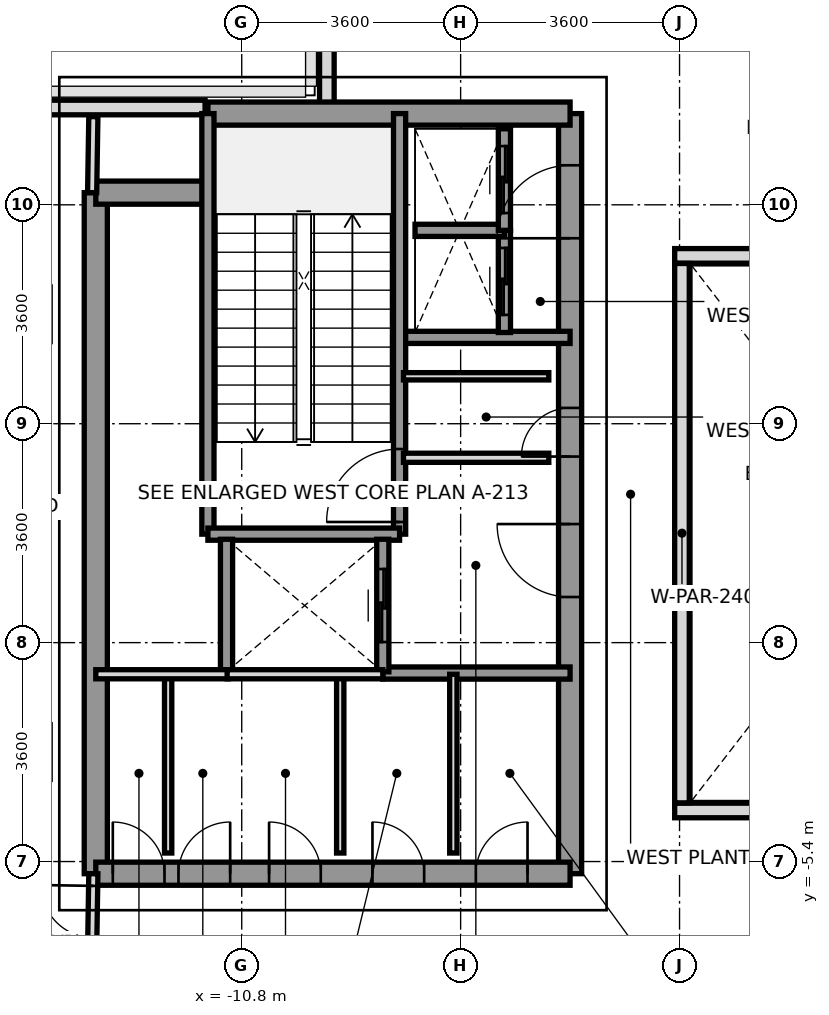
"""IFC4 building model, lengths in metres.
Left out: names, types, materials, properties, quantities, classifications, styles, units other than length and angle.
Written with IfcOpenShell. Run it as: python <this file> out.ifc"""

import sys

from ifc_helpers import new_model, si_unit, direction, frame, frame_2d, origin, place, context, subcontext, project, spatial, rectangle, extrude, source, transform, mapped, element, fill, save


model = new_model("IFC4")
c1 = context("Model", 3, precision=1e-05, world=origin(), true_north=direction((0.0, 1.0)))
c2 = subcontext(c1, "Body", "Model", "MODEL_VIEW")
j1 = project(units=[si_unit("LENGTHUNIT", "METRE"), si_unit("PLANEANGLEUNIT", "RADIAN")], contexts=[c1])
p1 = place(None, origin())
s1 = spatial("IfcSite", under=j1, at=p1, CompositionType="ELEMENT")
p2 = place(p1, origin())
s2 = spatial("IfcBuilding", under=s1, at=p2, CompositionType="ELEMENT")
p3 = place(p2, frame((0.0, 0.0, 214.8)))
s3 = spatial("IfcBuildingStorey", under=s2, at=p3, CompositionType="ELEMENT", Elevation=214.8)
p4 = place(p3, frame((-14.072, 7.0, 0.0), z_axis=(0.0, 0.0, 1.0), x_axis=(1.0, 0.0, 0.0)))
e1 = element("IfcWall", 1, at=p4, inside=s3, PredefinedType="PARAPET", context=c2, shape_type="SweptSolid", body=[
    extrude(rectangle(XDim=2.669, YDim=0.24, at=frame_2d((1.334, 0.0))), origin(), (0.0, 0.0, 1.0), 1.15),
])
p5 = place(p3, frame((-9.4, 6.953, 0.0), z_axis=(0.0, 0.0, 1.0), x_axis=(0.0, 1.0, 0.0)))
e2 = element("IfcWall", 2, at=p5, inside=s3, PredefinedType="PARAPET", context=c2, shape_type="SweptSolid", body=[
    extrude(rectangle(XDim=1.594, YDim=0.24, at=frame_2d((0.797, 0.0))), origin(), (0.0, 0.0, 1.0), 1.15),
])
p6 = place(p3, frame((-13.2, -5.6, 0.0), z_axis=(0.0, 0.0, 1.0), x_axis=(0.0, 1.0, 0.0)))
e3 = element("IfcWall", 3, at=p6, inside=s3, PredefinedType="SHEAR", context=c2, shape_type="SweptSolid", body=[
    extrude(rectangle(XDim=11.2, YDim=0.38, at=frame_2d((5.6, 0.0))), origin(), (0.0, 0.0, 1.0), 4.41),
])
p7 = place(p3, frame((-5.4, -5.6, 0.0), z_axis=(0.0, 0.0, 1.0), x_axis=(0.0, 1.0, 0.0)))
e4 = element("IfcWall", 4, at=p7, inside=s3, PredefinedType="SHEAR", context=c2, shape_type="SweptSolid", body=[
    extrude(rectangle(XDim=12.5, YDim=0.38, at=frame_2d((6.25, 0.0))), origin(), (0.0, 0.0, 1.0), 4.41),
])
p8 = place(p7, frame((4.55, 0.0, 0.0)))
e5 = element("IfcOpeningElement", 5, at=p8, cuts=e4, PredefinedType="OPENING", context=c2, shape_type="SweptSolid", body=[
    extrude(rectangle(XDim=1.2, YDim=2.2, at=frame_2d((0.6, 1.1))), frame((0.0, 0.2, 0.0), z_axis=(0.0, -1.0, 0.0), x_axis=(1.0, 0.0, 0.0)), (0.0, 0.0, 1.0), 0.4),
])
p9 = place(p7, frame((10.45, 0.0, 0.0)))
e6 = element("IfcOpeningElement", 6, at=p9, cuts=e4, PredefinedType="OPENING", context=c2, shape_type="SweptSolid", body=[
    extrude(rectangle(XDim=1.2, YDim=2.2, at=frame_2d((0.6, 1.1))), frame((0.0, 0.2, 0.0), z_axis=(0.0, -1.0, 0.0), x_axis=(1.0, 0.0, 0.0)), (0.0, 0.0, 1.0), 0.4),
])
p10 = place(p7, frame((6.86, 0.0, 0.0)))
e7 = element("IfcOpeningElement", 7, at=p10, cuts=e4, PredefinedType="OPENING", context=c2, shape_type="SweptSolid", body=[
    extrude(rectangle(XDim=0.8, YDim=2.1, at=frame_2d((0.4, 1.05))), frame((0.0, 0.2, 0.0), z_axis=(0.0, -1.0, 0.0), x_axis=(1.0, 0.0, 0.0)), (0.0, 0.0, 1.0), 0.4),
])
p11 = place(p3, frame((-11.356, 6.9, 0.0), z_axis=(0.0, 0.0, 1.0), x_axis=(1.0, 0.0, 0.0)))
e8 = element("IfcWall", 8, at=p11, inside=s3, PredefinedType="SHEAR", context=c2, shape_type="SweptSolid", body=[
    extrude(rectangle(XDim=5.956, YDim=0.38, at=frame_2d((2.978, 0.0))), origin(), (0.0, 0.0, 1.0), 4.41),
])
p12 = place(p3, frame((-13.2, 5.6, 0.0), z_axis=(0.0, 0.0, 1.0), x_axis=(1.0, 0.0, 0.0)))
e9 = element("IfcWall", 9, at=p12, inside=s3, PredefinedType="SHEAR", context=c2, shape_type="SweptSolid", body=[
    extrude(rectangle(XDim=1.844, YDim=0.38, at=frame_2d((0.922, 0.0))), origin(), (0.0, 0.0, 1.0), 4.41),
])
p13 = place(p3, frame((-13.2, -5.6, 0.0), z_axis=(0.0, 0.0, 1.0), x_axis=(1.0, 0.0, 0.0)))
e10 = element("IfcWall", 10, at=p13, inside=s3, PredefinedType="SHEAR", context=c2, shape_type="SweptSolid", body=[
    extrude(rectangle(XDim=7.8, YDim=0.38, at=frame_2d((3.9, 0.0))), origin(), (0.0, 0.0, 1.0), 4.41),
])
p14 = place(p13, frame((0.28, 0.0, 0.0)))
e11 = element("IfcOpeningElement", 11, at=p14, cuts=e10, PredefinedType="OPENING", context=c2, shape_type="SweptSolid", body=[
    extrude(rectangle(XDim=0.85, YDim=2.1, at=frame_2d((0.425, 1.05))), frame((0.0, 0.2, 0.0), z_axis=(0.0, -1.0, 0.0), x_axis=(1.0, 0.0, 0.0)), (0.0, 0.0, 1.0), 0.4),
])
p15 = place(p13, frame((1.36, 0.0, 0.0)))
e12 = element("IfcOpeningElement", 12, at=p15, cuts=e10, PredefinedType="OPENING", context=c2, shape_type="SweptSolid", body=[
    extrude(rectangle(XDim=0.85, YDim=2.1, at=frame_2d((0.425, 1.05))), frame((0.0, 0.2, 0.0), z_axis=(0.0, -1.0, 0.0), x_axis=(1.0, 0.0, 0.0)), (0.0, 0.0, 1.0), 0.4),
])
p16 = place(p13, frame((2.85, 0.0, 0.0)))
e13 = element("IfcOpeningElement", 13, at=p16, cuts=e10, PredefinedType="OPENING", context=c2, shape_type="SweptSolid", body=[
    extrude(rectangle(XDim=0.85, YDim=2.1, at=frame_2d((0.425, 1.05))), frame((0.0, 0.2, 0.0), z_axis=(0.0, -1.0, 0.0), x_axis=(1.0, 0.0, 0.0)), (0.0, 0.0, 1.0), 0.4),
])
p17 = place(p13, frame((4.55, 0.0, 0.0)))
e14 = element("IfcOpeningElement", 14, at=p17, cuts=e10, PredefinedType="OPENING", context=c2, shape_type="SweptSolid", body=[
    extrude(rectangle(XDim=0.85, YDim=2.1, at=frame_2d((0.425, 1.05))), frame((0.0, 0.2, 0.0), z_axis=(0.0, -1.0, 0.0), x_axis=(1.0, 0.0, 0.0)), (0.0, 0.0, 1.0), 0.4),
])
p18 = place(p13, frame((6.25, 0.0, 0.0)))
e15 = element("IfcOpeningElement", 15, at=p18, cuts=e10, PredefinedType="OPENING", context=c2, shape_type="SweptSolid", body=[
    extrude(rectangle(XDim=0.85, YDim=2.1, at=frame_2d((0.425, 1.05))), frame((0.0, 0.2, 0.0), z_axis=(0.0, -1.0, 0.0), x_axis=(1.0, 0.0, 0.0)), (0.0, 0.0, 1.0), 0.4),
])
p19 = place(p3, frame((-8.18, 3.22, 0.0), z_axis=(0.0, 0.0, 1.0), x_axis=(1.0, 0.0, 0.0)))
e16 = element("IfcWall", 16, at=p19, inside=s3, PredefinedType="SOLIDWALL", context=c2, shape_type="SweptSolid", body=[
    extrude(rectangle(XDim=2.78, YDim=0.2, at=frame_2d((1.39, 0.0))), origin(), (0.0, 0.0, 1.0), 4.41),
])
p20 = place(p3, frame((-8.48, -2.3, 0.0), z_axis=(0.0, 0.0, 1.0), x_axis=(1.0, 0.0, 0.0)))
e17 = element("IfcWall", 17, at=p20, inside=s3, PredefinedType="SOLIDWALL", context=c2, shape_type="SweptSolid", body=[
    extrude(rectangle(XDim=3.08, YDim=0.2, at=frame_2d((1.54, 0.0))), origin(), (0.0, 0.0, 1.0), 4.41),
])
p21 = place(p3, frame((-8.204, -0.016, 0.0), z_axis=(0.0, 0.0, 1.0), x_axis=(0.0, 1.0, 0.0)))
e18 = element("IfcWall", 18, at=p21, inside=s3, PredefinedType="SOLIDWALL", context=c2, shape_type="SweptSolid", body=[
    extrude(rectangle(XDim=6.916, YDim=0.2, at=frame_2d((3.458, 0.0))), origin(), (0.0, 0.0, 1.0), 4.41),
])
p22 = place(p21, frame((0.2, 0.0, 0.0)))
e19 = element("IfcOpeningElement", 19, at=p22, cuts=e18, PredefinedType="OPENING", context=c2, shape_type="SweptSolid", body=[
    extrude(rectangle(XDim=1.2, YDim=2.2, at=frame_2d((0.6, 1.1))), frame((0.0, 0.11, 0.0), z_axis=(0.0, -1.0, 0.0), x_axis=(1.0, 0.0, 0.0)), (0.0, 0.0, 1.0), 0.22),
])
p23 = place(p3, frame((-11.356, -0.016, 0.0), z_axis=(0.0, 0.0, 1.0), x_axis=(0.0, 1.0, 0.0)))
e20 = element("IfcWall", 20, at=p23, inside=s3, PredefinedType="SOLIDWALL", context=c2, shape_type="SweptSolid", body=[
    extrude(rectangle(XDim=6.916, YDim=0.2, at=frame_2d((3.458, 0.0))), origin(), (0.0, 0.0, 1.0), 4.41),
])
p24 = place(p3, frame((-11.356, -0.016, 0.0), z_axis=(0.0, 0.0, 1.0), x_axis=(1.0, 0.0, 0.0)))
e21 = element("IfcWall", 21, at=p24, inside=s3, PredefinedType="SOLIDWALL", context=c2, shape_type="SweptSolid", body=[
    extrude(rectangle(XDim=3.152, YDim=0.2, at=frame_2d((1.576, 0.0))), origin(), (0.0, 0.0, 1.0), 4.41),
])
p25 = place(p3, frame((-11.05, -2.28, 0.0), z_axis=(0.0, 0.0, 1.0), x_axis=(0.0, 1.0, 0.0)))
e22 = element("IfcWall", 22, at=p25, inside=s3, PredefinedType="SOLIDWALL", context=c2, shape_type="SweptSolid", body=[
    extrude(rectangle(XDim=2.18, YDim=0.2, at=frame_2d((1.09, 0.0))), origin(), (0.0, 0.0, 1.0), 4.41),
])
p26 = place(p3, frame((-8.48, -2.28, 0.0), z_axis=(0.0, 0.0, 1.0), x_axis=(0.0, 1.0, 0.0)))
e23 = element("IfcWall", 23, at=p26, inside=s3, PredefinedType="SOLIDWALL", context=c2, shape_type="SweptSolid", body=[
    extrude(rectangle(XDim=2.18, YDim=0.2, at=frame_2d((1.09, 0.0))), origin(), (0.0, 0.0, 1.0), 4.41),
])
p27 = place(p26, frame((0.49, 0.0, 0.0)))
e24 = element("IfcOpeningElement", 24, at=p27, cuts=e23, PredefinedType="OPENING", context=c2, shape_type="SweptSolid", body=[
    extrude(rectangle(XDim=1.2, YDim=2.2, at=frame_2d((0.6, 1.1))), frame((0.0, 0.11, 0.0), z_axis=(0.0, -1.0, 0.0), x_axis=(1.0, 0.0, 0.0)), (0.0, 0.0, 1.0), 0.22),
])
p28 = place(p3, frame((-6.48, 3.3, 0.0), z_axis=(0.0, 0.0, 1.0), x_axis=(0.0, 1.0, 0.0)))
e25 = element("IfcWall", 25, at=p28, inside=s3, PredefinedType="SOLIDWALL", context=c2, shape_type="SweptSolid", body=[
    extrude(rectangle(XDim=1.68, YDim=0.2, at=frame_2d((0.84, 0.0))), origin(), (0.0, 0.0, 1.0), 4.41),
])
p29 = place(p28, frame((0.29, 0.0, 0.0)))
e26 = element("IfcOpeningElement", 26, at=p29, cuts=e25, PredefinedType="OPENING", context=c2, shape_type="SweptSolid", body=[
    extrude(rectangle(XDim=1.1, YDim=2.2, at=frame_2d((0.55, 1.1))), frame((0.0, 0.11, 0.0), z_axis=(0.0, -1.0, 0.0), x_axis=(1.0, 0.0, 0.0)), (0.0, 0.0, 1.0), 0.22),
])
p30 = place(p3, frame((-7.95, 4.98, 0.0), z_axis=(0.0, 0.0, 1.0), x_axis=(1.0, 0.0, 0.0)))
e27 = element("IfcWall", 27, at=p30, inside=s3, PredefinedType="SOLIDWALL", context=c2, shape_type="SweptSolid", body=[
    extrude(rectangle(XDim=1.47, YDim=0.2, at=frame_2d((0.735, 0.0))), origin(), (0.0, 0.0, 1.0), 4.41),
])
p31 = place(p3, frame((-6.48, 4.98, 0.0), z_axis=(0.0, 0.0, 1.0), x_axis=(0.0, 1.0, 0.0)))
e28 = element("IfcWall", 28, at=p31, inside=s3, PredefinedType="SOLIDWALL", context=c2, shape_type="SweptSolid", body=[
    extrude(rectangle(XDim=1.67, YDim=0.2, at=frame_2d((0.835, 0.0))), origin(), (0.0, 0.0, 1.0), 4.41),
])
p32 = place(p31, frame((0.285, 0.0, 0.0)))
e29 = element("IfcOpeningElement", 29, at=p32, cuts=e28, PredefinedType="OPENING", context=c2, shape_type="SweptSolid", body=[
    extrude(rectangle(XDim=1.1, YDim=2.2, at=frame_2d((0.55, 1.1))), frame((0.0, 0.11, 0.0), z_axis=(0.0, -1.0, 0.0), x_axis=(1.0, 0.0, 0.0)), (0.0, 0.0, 1.0), 0.22),
])
p33 = place(p3, frame((-8.14, 1.24, 0.0), z_axis=(0.0, 0.0, 1.0), x_axis=(1.0, 0.0, 0.0)))
e30 = element("IfcWall", 30, at=p33, inside=s3, PredefinedType="PARTITIONING", context=c2, shape_type="SweptSolid", body=[
    extrude(rectangle(XDim=2.39, YDim=0.15, at=frame_2d((1.195, 0.0))), origin(), (0.0, 0.0, 1.0), 3.51),
])
p34 = place(p3, frame((-8.14, 2.58, 0.0), z_axis=(0.0, 0.0, 1.0), x_axis=(1.0, 0.0, 0.0)))
e31 = element("IfcWall", 31, at=p34, inside=s3, PredefinedType="PARTITIONING", context=c2, shape_type="SweptSolid", body=[
    extrude(rectangle(XDim=2.39, YDim=0.12, at=frame_2d((1.195, 0.0))), origin(), (0.0, 0.0, 1.0), 3.51),
])
p35 = place(p3, frame((-12.01, -5.26, 0.0), z_axis=(0.0, 0.0, 1.0), x_axis=(0.0, 1.0, 0.0)))
e32 = element("IfcWall", 32, at=p35, inside=s3, PredefinedType="PARTITIONING", context=c2, shape_type="SweptSolid", body=[
    extrude(rectangle(XDim=2.94, YDim=0.12, at=frame_2d((1.47, 0.0))), origin(), (0.0, 0.0, 1.0), 4.41),
])
p36 = place(p3, frame((-13.2, -2.32, 0.0), z_axis=(0.0, 0.0, 1.0), x_axis=(1.0, 0.0, 0.0)))
e33 = element("IfcWall", 33, at=p36, inside=s3, PredefinedType="PARTITIONING", context=c2, shape_type="SweptSolid", body=[
    extrude(rectangle(XDim=2.18, YDim=0.15, at=frame_2d((1.09, 0.0))), origin(), (0.0, 0.0, 1.0), 4.41),
])
for number, where, z_axis, x_axis in (
    (34, (-9.18, -5.26, 0.0), (0.0, 0.0, 1.0), (0.0, 1.0, 0.0)),
    (35, (-7.32, -5.26, 0.0), (0.0, 0.0, 1.0), (0.0, 1.0, 0.0)),
):
    element("IfcWall", number, at=place(p3, frame(where, z_axis=z_axis, x_axis=x_axis)), inside=s3, PredefinedType="PARTITIONING", context=c2, shape_type="SweptSolid", body=[
        extrude(rectangle(XDim=2.94, YDim=0.12, at=frame_2d((1.47, 0.0))), origin(), (0.0, 0.0, 1.0), 4.41),
    ])
p37 = place(p3, frame((-11.04, -2.32, 0.0), z_axis=(0.0, 0.0, 1.0), x_axis=(1.0, 0.0, 0.0)))
e36 = element("IfcWall", 36, at=p37, inside=s3, PredefinedType="PARTITIONING", context=c2, shape_type="SweptSolid", body=[
    extrude(rectangle(XDim=2.56, YDim=0.15, at=frame_2d((1.28, 0.0))), origin(), (0.0, 0.0, 1.0), 4.41),
])
p38 = place(p3, frame((-13.26, -6.85, 0.0), z_axis=(0.0, 0.0, 1.0), x_axis=(0.016013571389, 0.999871774545, 0.0)))
e37 = element("IfcWall", 37, at=p38, inside=s3, PredefinedType="PARTITIONING", context=c2, shape_type="SweptSolid", body=[
    extrude(rectangle(XDim=1.25, YDim=0.15, at=frame_2d((0.625, 0.0))), origin(), (0.0, 0.0, 1.0), 4.41),
])
p39 = place(p38, frame((0.2, 0.0, 0.0)))
e38 = element("IfcOpeningElement", 38, at=p39, cuts=e37, PredefinedType="OPENING", context=c2, shape_type="SweptSolid", body=[
    extrude(rectangle(XDim=0.85, YDim=2.1, at=frame_2d((0.425, 1.05))), frame((0.0, 0.085, 0.0), z_axis=(0.0, -1.0, 0.0), x_axis=(1.0, 0.0, 0.0)), (0.0, 0.0, 1.0), 0.17),
])
p40 = place(p3, frame((-13.26, 5.6, 0.0), z_axis=(0.0, 0.0, 1.0), x_axis=(0.016013571389, 0.999871774545, 0.0)))
e39 = element("IfcWall", 39, at=p40, inside=s3, PredefinedType="PARTITIONING", context=c2, shape_type="SweptSolid", body=[
    extrude(rectangle(XDim=1.25, YDim=0.15, at=frame_2d((0.625, 0.0))), origin(), (0.0, 0.0, 1.0), 4.41),
])
for number, where, z_axis, x_axis in (
    (40, (-3.68, -4.56, 0.0), (0.0, 0.0, 1.0), (1.0, 0.0, 0.0)),
    (41, (-3.68, 4.56, 0.0), (0.0, 0.0, 1.0), (1.0, 0.0, 0.0)),
):
    element("IfcWall", number, at=place(p3, frame(where, z_axis=z_axis, x_axis=x_axis)), inside=s3, PredefinedType="PARAPET", context=c2, shape_type="SweptSolid", body=[
        extrude(rectangle(XDim=7.36, YDim=0.24, at=frame_2d((3.68, 0.0))), origin(), (0.0, 0.0, 1.0), 1.15),
    ])
p41 = place(p3, frame((-3.56, -4.435, 0.0), z_axis=(0.0, 0.0, 1.0), x_axis=(0.0, 1.0, 0.0)))
e42 = element("IfcWall", 42, at=p41, inside=s3, PredefinedType="PARAPET", context=c2, shape_type="SweptSolid", body=[
    extrude(rectangle(XDim=8.87, YDim=0.24, at=frame_2d((4.435, 0.0))), origin(), (0.0, 0.0, 1.0), 1.15),
])
m1 = source(origin(), c2, "Body", "SweptSolid", [
    extrude(rectangle(XDim=1.2, YDim=2.2, at=frame_2d((0.6, 1.1))), frame((0.0, 0.025, 0.0), z_axis=(0.0, -1.0, 0.0), x_axis=(1.0, 0.0, 0.0)), (0.0, 0.0, 1.0), 0.05),
])
p42 = place(p22, origin())
e43 = element("IfcDoor", 43, at=p42, inside=s3, OperationType="SINGLE_SWING_LEFT", PredefinedType="DOOR", context=c2, shape_type="MappedRepresentation", body=[
    mapped(m1, transform((0.0, 0.0, 0.0), x_axis=(1.0, 0.0, 0.0), y_axis=(0.0, 1.0, 0.0), z_axis=(0.0, 0.0, 1.0), scale=1.0)),
])
fill(e19, e43)
p43 = place(p8, origin())
e44 = element("IfcDoor", 44, at=p43, inside=s3, OperationType="SINGLE_SWING_RIGHT", PredefinedType="DOOR", context=c2, shape_type="MappedRepresentation", body=[
    mapped(m1, transform((0.0, 0.0, 0.0), x_axis=(1.0, 0.0, 0.0), y_axis=(0.0, 1.0, 0.0), z_axis=(0.0, 0.0, 1.0), scale=1.0)),
])
fill(e5, e44)
p44 = place(p9, origin())
e45 = element("IfcDoor", 45, at=p44, inside=s3, OperationType="SINGLE_SWING_LEFT", PredefinedType="DOOR", context=c2, shape_type="MappedRepresentation", body=[
    mapped(m1, transform((0.0, 0.0, 0.0), x_axis=(1.0, 0.0, 0.0), y_axis=(0.0, 1.0, 0.0), z_axis=(0.0, 0.0, 1.0), scale=1.0)),
])
fill(e6, e45)
m2 = source(origin(), c2, "Body", "SweptSolid", [
    extrude(rectangle(XDim=0.8, YDim=2.1, at=frame_2d((0.4, 1.05))), frame((0.0, 0.025, 0.0), z_axis=(0.0, -1.0, 0.0), x_axis=(1.0, 0.0, 0.0)), (0.0, 0.0, 1.0), 0.05),
])
p45 = place(p10, origin())
e46 = element("IfcDoor", 46, at=p45, inside=s3, OperationType="SINGLE_SWING_LEFT", PredefinedType="DOOR", context=c2, shape_type="MappedRepresentation", body=[
    mapped(m2, transform((0.0, 0.0, 0.0), x_axis=(1.0, 0.0, 0.0), y_axis=(0.0, 1.0, 0.0), z_axis=(0.0, 0.0, 1.0), scale=1.0)),
])
fill(e7, e46)
m3 = source(origin(), c2, "Body", "SweptSolid", [
    extrude(rectangle(XDim=0.85, YDim=2.1, at=frame_2d((0.425, 1.05))), frame((0.0, 0.025, 0.0), z_axis=(0.0, -1.0, 0.0), x_axis=(1.0, 0.0, 0.0)), (0.0, 0.0, 1.0), 0.05),
])
p46 = place(p14, origin())
e47 = element("IfcDoor", 47, at=p46, inside=s3, OperationType="SINGLE_SWING_LEFT", PredefinedType="DOOR", context=c2, shape_type="MappedRepresentation", body=[
    mapped(m3, transform((0.0, 0.0, 0.0), x_axis=(1.0, 0.0, 0.0), y_axis=(0.0, 1.0, 0.0), z_axis=(0.0, 0.0, 1.0), scale=1.0)),
])
fill(e11, e47)
p47 = place(p15, origin())
e48 = element("IfcDoor", 48, at=p47, inside=s3, OperationType="SINGLE_SWING_RIGHT", PredefinedType="DOOR", context=c2, shape_type="MappedRepresentation", body=[
    mapped(m3, transform((0.0, 0.0, 0.0), x_axis=(1.0, 0.0, 0.0), y_axis=(0.0, 1.0, 0.0), z_axis=(0.0, 0.0, 1.0), scale=1.0)),
])
fill(e12, e48)
p48 = place(p16, origin())
e49 = element("IfcDoor", 49, at=p48, inside=s3, OperationType="SINGLE_SWING_LEFT", PredefinedType="DOOR", context=c2, shape_type="MappedRepresentation", body=[
    mapped(m3, transform((0.0, 0.0, 0.0), x_axis=(1.0, 0.0, 0.0), y_axis=(0.0, 1.0, 0.0), z_axis=(0.0, 0.0, 1.0), scale=1.0)),
])
fill(e13, e49)
p49 = place(p17, origin())
e50 = element("IfcDoor", 50, at=p49, inside=s3, OperationType="SINGLE_SWING_LEFT", PredefinedType="DOOR", context=c2, shape_type="MappedRepresentation", body=[
    mapped(m3, transform((0.0, 0.0, 0.0), x_axis=(1.0, 0.0, 0.0), y_axis=(0.0, 1.0, 0.0), z_axis=(0.0, 0.0, 1.0), scale=1.0)),
])
fill(e14, e50)
p50 = place(p18, origin())
e51 = element("IfcDoor", 51, at=p50, inside=s3, OperationType="SINGLE_SWING_RIGHT", PredefinedType="DOOR", context=c2, shape_type="MappedRepresentation", body=[
    mapped(m3, transform((0.0, 0.0, 0.0), x_axis=(1.0, 0.0, 0.0), y_axis=(0.0, 1.0, 0.0), z_axis=(0.0, 0.0, 1.0), scale=1.0)),
])
fill(e15, e51)
p51 = place(p27, origin())
e52 = element("IfcDoor", 52, at=p51, inside=s3, OperationType="SLIDING_TO_RIGHT", PredefinedType="DOOR", context=c2, shape_type="MappedRepresentation", body=[
    mapped(m1, transform((0.0, 0.0, 0.0), x_axis=(1.0, 0.0, 0.0), y_axis=(0.0, 1.0, 0.0), z_axis=(0.0, 0.0, 1.0), scale=1.0)),
])
fill(e24, e52)
m4 = source(origin(), c2, "Body", "SweptSolid", [
    extrude(rectangle(XDim=1.1, YDim=2.2, at=frame_2d((0.55, 1.1))), frame((0.0, 0.025, 0.0), z_axis=(0.0, -1.0, 0.0), x_axis=(1.0, 0.0, 0.0)), (0.0, 0.0, 1.0), 0.05),
])
p52 = place(p29, origin())
e53 = element("IfcDoor", 53, at=p52, inside=s3, OperationType="SLIDING_TO_LEFT", PredefinedType="DOOR", context=c2, shape_type="MappedRepresentation", body=[
    mapped(m4, transform((0.0, 0.0, 0.0), x_axis=(1.0, 0.0, 0.0), y_axis=(0.0, 1.0, 0.0), z_axis=(0.0, 0.0, 1.0), scale=1.0)),
])
fill(e26, e53)
p53 = place(p32, origin())
e54 = element("IfcDoor", 54, at=p53, inside=s3, OperationType="SLIDING_TO_LEFT", PredefinedType="DOOR", context=c2, shape_type="MappedRepresentation", body=[
    mapped(m4, transform((0.0, 0.0, 0.0), x_axis=(1.0, 0.0, 0.0), y_axis=(0.0, 1.0, 0.0), z_axis=(0.0, 0.0, 1.0), scale=1.0)),
])
fill(e29, e54)
p54 = place(p39, origin())
e55 = element("IfcDoor", 55, at=p54, inside=s3, OperationType="SINGLE_SWING_RIGHT", PredefinedType="DOOR", context=c2, shape_type="MappedRepresentation", body=[
    mapped(m3, transform((0.0, 0.0, 0.0), x_axis=(1.0, 0.0, 0.0), y_axis=(0.0, 1.0, 0.0), z_axis=(0.0, 0.0, 1.0), scale=1.0)),
])
fill(e38, e55)
save(model, sys.argv[1])
